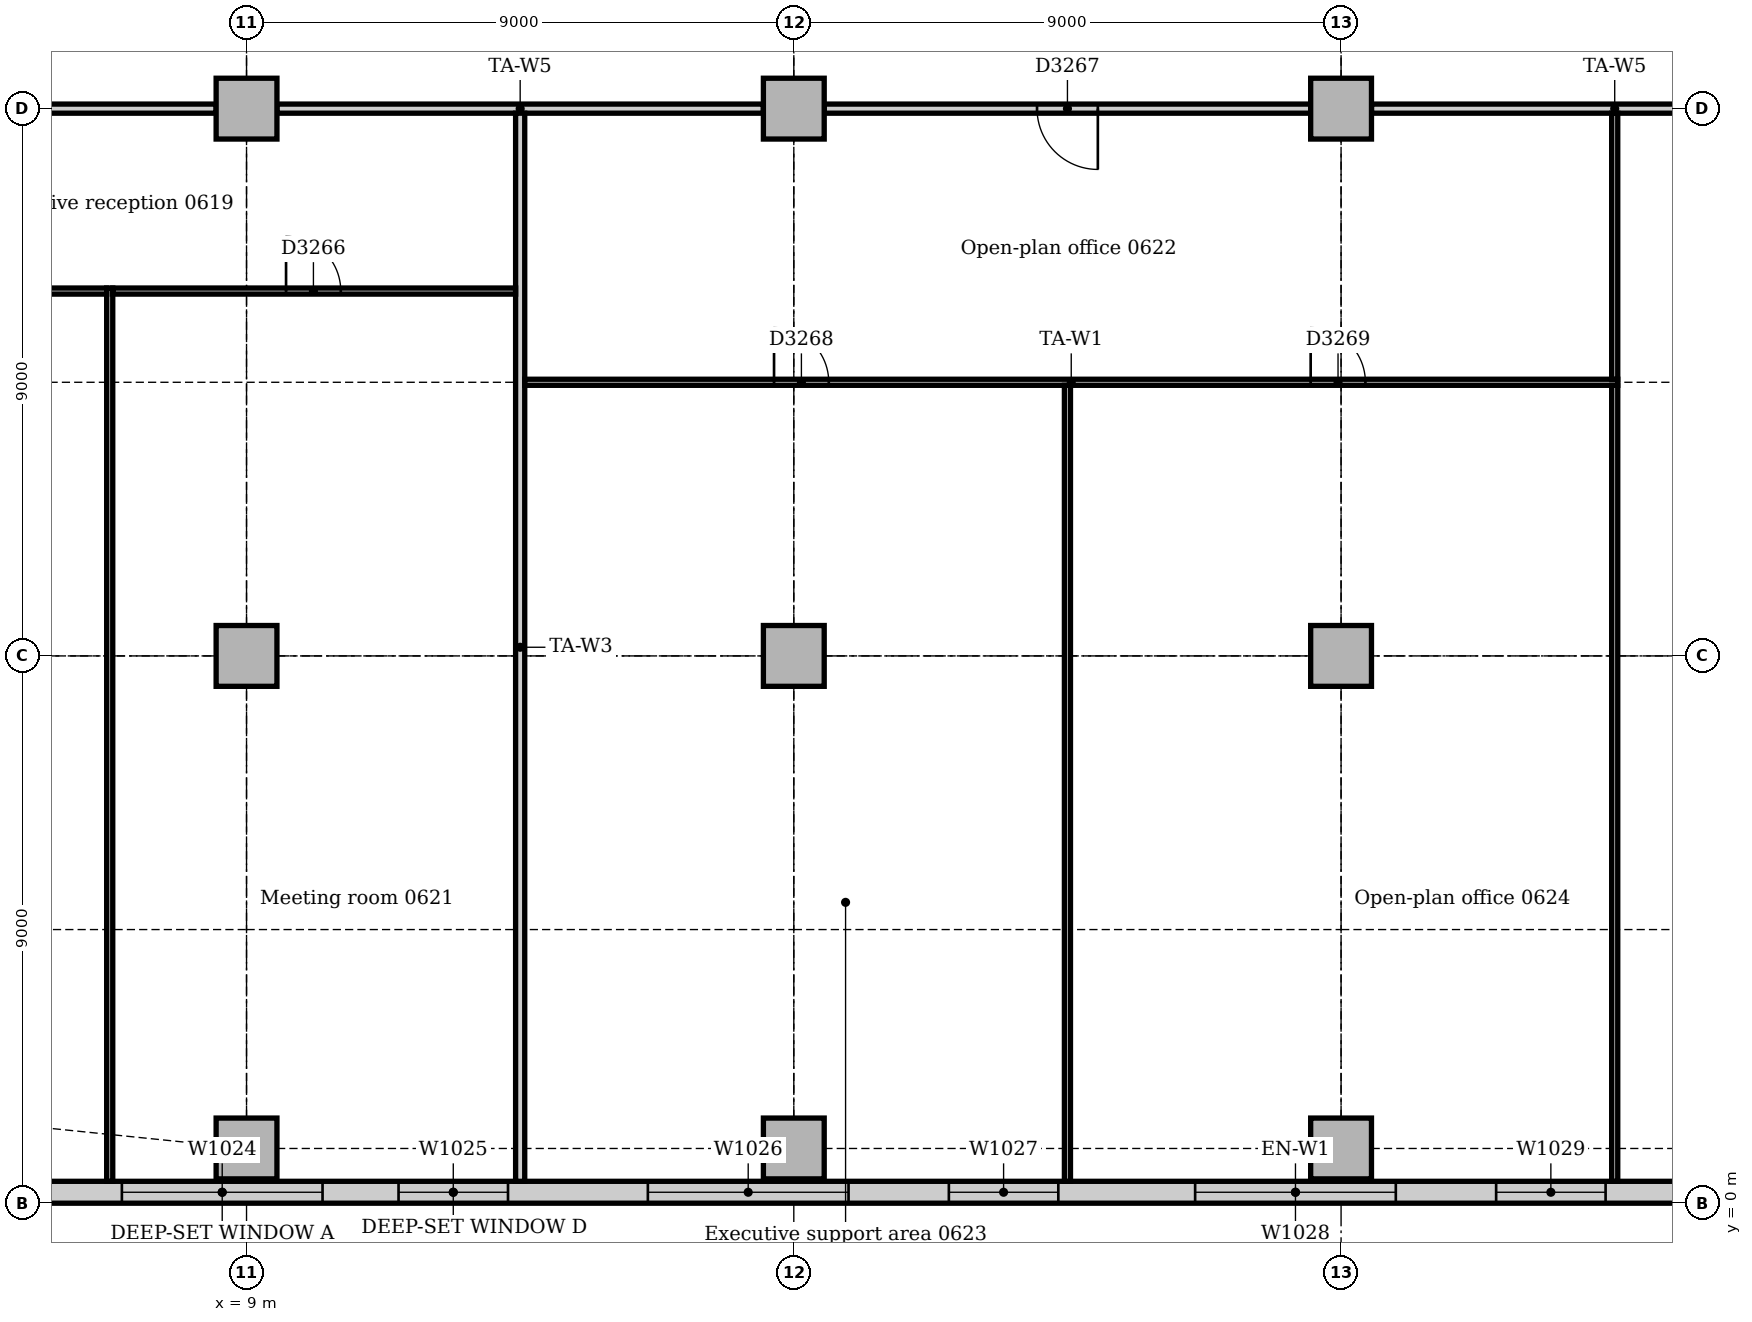
"""IFC4 building model, lengths in metres.
Left out: names, types, materials, properties, quantities, classifications, styles, units other than length and angle.
Written with IfcOpenShell. Run it as: python <this file> out.ifc"""

import sys

from ifc_helpers import new_model, si_unit, direction, frame, frame_2d, origin, origin_2d, place, context, subcontext, project, spatial, rectangle, extrude, element, fill, save


model = new_model("IFC4")
c1 = context("Model", 3, precision=1e-05, world=origin(), true_north=direction((0.0, 1.0)))
c2 = subcontext(c1, "Body", "Model", "MODEL_VIEW")
j1 = project(units=[si_unit("LENGTHUNIT", "METRE"), si_unit("PLANEANGLEUNIT", "RADIAN")], contexts=[c1])
p1 = place(None, origin())
s1 = spatial("IfcSite", under=j1, at=p1, CompositionType="ELEMENT")
p2 = place(p1, origin())
s2 = spatial("IfcBuilding", under=s1, at=p2, CompositionType="ELEMENT")
p3 = place(p2, frame((0.0, 0.0, 30.0)))
s3 = spatial("IfcBuildingStorey", under=s2, at=p3, CompositionType="ELEMENT", Elevation=30.0)
for number, where, z_axis, x_axis in (
    (1, (9.0, 0.9, 0.0), (0.0, 0.0, 1.0), (1.0, 0.0, 0.0)),
    (2, (18.0, 0.9, 0.0), (0.0, 0.0, 1.0), (1.0, 0.0, 0.0)),
    (3, (27.0, 0.9, 0.0), (0.0, 0.0, 1.0), (1.0, 0.0, 0.0)),
    (4, (9.0, 9.0, 0.0), (0.0, 0.0, 1.0), (1.0, 0.0, 0.0)),
    (5, (9.0, 18.0, 0.0), (0.0, 0.0, 1.0), (1.0, 0.0, 0.0)),
    (6, (18.0, 9.0, 0.0), (0.0, 0.0, 1.0), (1.0, 0.0, 0.0)),
    (7, (18.0, 18.0, 0.0), (0.0, 0.0, 1.0), (1.0, 0.0, 0.0)),
    (8, (27.0, 9.0, 0.0), (0.0, 0.0, 1.0), (1.0, 0.0, 0.0)),
    (9, (27.0, 18.0, 0.0), (0.0, 0.0, 1.0), (1.0, 0.0, 0.0)),
):
    element("IfcColumn", number, at=place(p3, frame(where, z_axis=z_axis, x_axis=x_axis)), inside=s3, PredefinedType="COLUMN", context=c2, shape_type="SweptSolid", body=[
        extrude(rectangle(XDim=1.0, YDim=1.0, at=origin_2d()), origin(), (0.0, 0.0, 1.0), 3.85),
    ])
p4 = place(p3, frame((4.243, 0.18, 0.0), z_axis=(0.0, 0.0, 1.0), x_axis=(1.0, 0.0, 0.0)))
e10 = element("IfcWall", 10, at=p4, inside=s3, PredefinedType="STANDARD", context=c2, shape_type="SweptSolid", body=[
    extrude(rectangle(XDim=44.015, YDim=0.36, at=frame_2d((22.007, 0.0))), origin(), (0.0, 0.0, 1.0), 3.85),
])
p5 = place(p4, frame((2.707, 0.0, 0.9)))
e11 = element("IfcOpeningElement", 11, at=p5, cuts=e10, PredefinedType="OPENING", context=c2, shape_type="SweptSolid", body=[
    extrude(rectangle(XDim=3.3, YDim=1.6, at=frame_2d((1.65, 0.8))), frame((0.0, 0.19, 0.0), z_axis=(0.0, -1.0, 0.0), x_axis=(1.0, 0.0, 0.0)), (0.0, 0.0, 1.0), 0.38),
])
p6 = place(p4, frame((7.257, 0.0, 0.9)))
e12 = element("IfcOpeningElement", 12, at=p6, cuts=e10, PredefinedType="OPENING", context=c2, shape_type="SweptSolid", body=[
    extrude(rectangle(XDim=1.8, YDim=1.6, at=frame_2d((0.9, 0.8))), frame((0.0, 0.19, 0.0), z_axis=(0.0, -1.0, 0.0), x_axis=(1.0, 0.0, 0.0)), (0.0, 0.0, 1.0), 0.38),
])
p7 = place(p4, frame((11.357, 0.0, 0.9)))
e13 = element("IfcOpeningElement", 13, at=p7, cuts=e10, PredefinedType="OPENING", context=c2, shape_type="SweptSolid", body=[
    extrude(rectangle(XDim=3.3, YDim=1.6, at=frame_2d((1.65, 0.8))), frame((0.0, 0.19, 0.0), z_axis=(0.0, -1.0, 0.0), x_axis=(1.0, 0.0, 0.0)), (0.0, 0.0, 1.0), 0.38),
])
p8 = place(p4, frame((16.307, 0.0, 0.9)))
e14 = element("IfcOpeningElement", 14, at=p8, cuts=e10, PredefinedType="OPENING", context=c2, shape_type="SweptSolid", body=[
    extrude(rectangle(XDim=1.8, YDim=1.6, at=frame_2d((0.9, 0.8))), frame((0.0, 0.19, 0.0), z_axis=(0.0, -1.0, 0.0), x_axis=(1.0, 0.0, 0.0)), (0.0, 0.0, 1.0), 0.38),
])
p9 = place(p4, frame((20.357, 0.0, 0.9)))
e15 = element("IfcOpeningElement", 15, at=p9, cuts=e10, PredefinedType="OPENING", context=c2, shape_type="SweptSolid", body=[
    extrude(rectangle(XDim=3.3, YDim=1.6, at=frame_2d((1.65, 0.8))), frame((0.0, 0.19, 0.0), z_axis=(0.0, -1.0, 0.0), x_axis=(1.0, 0.0, 0.0)), (0.0, 0.0, 1.0), 0.38),
])
p10 = place(p4, frame((25.307, 0.0, 0.9)))
e16 = element("IfcOpeningElement", 16, at=p10, cuts=e10, PredefinedType="OPENING", context=c2, shape_type="SweptSolid", body=[
    extrude(rectangle(XDim=1.8, YDim=1.6, at=frame_2d((0.9, 0.8))), frame((0.0, 0.19, 0.0), z_axis=(0.0, -1.0, 0.0), x_axis=(1.0, 0.0, 0.0)), (0.0, 0.0, 1.0), 0.38),
])
p11 = place(p4, frame((29.357, 0.0, 0.9)))
e17 = element("IfcOpeningElement", 17, at=p11, cuts=e10, PredefinedType="OPENING", context=c2, shape_type="SweptSolid", body=[
    extrude(rectangle(XDim=3.3, YDim=1.6, at=frame_2d((1.65, 0.8))), frame((0.0, 0.19, 0.0), z_axis=(0.0, -1.0, 0.0), x_axis=(1.0, 0.0, 0.0)), (0.0, 0.0, 1.0), 0.38),
])
p12 = place(p4, frame((33.857, 0.0, 0.9)))
e18 = element("IfcOpeningElement", 18, at=p12, cuts=e10, PredefinedType="OPENING", context=c2, shape_type="SweptSolid", body=[
    extrude(rectangle(XDim=3.3, YDim=1.6, at=frame_2d((1.65, 0.8))), frame((0.0, 0.19, 0.0), z_axis=(0.0, -1.0, 0.0), x_axis=(1.0, 0.0, 0.0)), (0.0, 0.0, 1.0), 0.38),
])
p13 = place(p4, frame((38.357, 0.0, 0.9)))
e19 = element("IfcOpeningElement", 19, at=p13, cuts=e10, PredefinedType="OPENING", context=c2, shape_type="SweptSolid", body=[
    extrude(rectangle(XDim=3.3, YDim=1.6, at=frame_2d((1.65, 0.8))), frame((0.0, 0.19, 0.0), z_axis=(0.0, -1.0, 0.0), x_axis=(1.0, 0.0, 0.0)), (0.0, 0.0, 1.0), 0.38),
])
p14 = place(p3, frame((27.5, 18.0, 0.0), z_axis=(0.0, 0.0, 1.0), x_axis=(1.0, 0.0, 0.0)))
e20 = element("IfcWall", 20, at=p14, inside=s3, PredefinedType="PARTITIONING", context=c2, shape_type="SweptSolid", body=[
    extrude(rectangle(XDim=8.0, YDim=0.15, at=frame_2d((4.0, 0.0))), origin(), (0.0, 0.0, 1.0), 3.15),
])
p15 = place(p3, frame((18.5, 18.0, 0.0), z_axis=(0.0, 0.0, 1.0), x_axis=(1.0, 0.0, 0.0)))
e21 = element("IfcWall", 21, at=p15, inside=s3, PredefinedType="PARTITIONING", context=c2, shape_type="SweptSolid", body=[
    extrude(rectangle(XDim=8.0, YDim=0.15, at=frame_2d((4.0, 0.0))), origin(), (0.0, 0.0, 1.0), 3.15),
])
p16 = place(p15, frame((3.5, 0.0, 0.0)))
e22 = element("IfcOpeningElement", 22, at=p16, cuts=e21, PredefinedType="OPENING", context=c2, shape_type="SweptSolid", body=[
    extrude(rectangle(XDim=1.0, YDim=2.1, at=frame_2d((0.5, 1.05))), frame((0.0, 0.085, 0.0), z_axis=(0.0, -1.0, 0.0), x_axis=(1.0, 0.0, 0.0)), (0.0, 0.0, 1.0), 0.17),
])
p17 = place(p3, frame((9.5, 18.0, 0.0), z_axis=(0.0, 0.0, 1.0), x_axis=(1.0, 0.0, 0.0)))
e23 = element("IfcWall", 23, at=p17, inside=s3, PredefinedType="PARTITIONING", context=c2, shape_type="SweptSolid", body=[
    extrude(rectangle(XDim=8.0, YDim=0.15, at=frame_2d((4.0, 0.0))), origin(), (0.0, 0.0, 1.0), 3.15),
])
p18 = place(p3, frame((1.4, 18.0, 0.0), z_axis=(0.0, 0.0, 1.0), x_axis=(1.0, 0.0, 0.0)))
e24 = element("IfcWall", 24, at=p18, inside=s3, PredefinedType="PARTITIONING", context=c2, shape_type="SweptSolid", body=[
    extrude(rectangle(XDim=7.1, YDim=0.15, at=frame_2d((3.55, 0.0))), origin(), (0.0, 0.0, 1.0), 3.15),
])
p19 = place(p18, frame((3.05, 0.0, 0.0)))
e25 = element("IfcOpeningElement", 25, at=p19, cuts=e24, PredefinedType="OPENING", context=c2, shape_type="SweptSolid", body=[
    extrude(rectangle(XDim=1.0, YDim=2.1, at=frame_2d((0.5, 1.05))), frame((0.0, 0.085, 0.0), z_axis=(0.0, -1.0, 0.0), x_axis=(1.0, 0.0, 0.0)), (0.0, 0.0, 1.0), 0.17),
])
p20 = place(p3, frame((13.5, 0.36, 0.0), z_axis=(0.0, 0.0, 1.0), x_axis=(0.0, 1.0, 0.0)))
e26 = element("IfcWall", 26, at=p20, inside=s3, PredefinedType="PARTITIONING", context=c2, shape_type="SweptSolid", body=[
    extrude(rectangle(XDim=17.565, YDim=0.15, at=frame_2d((8.783, 0.0))), origin(), (0.0, 0.0, 1.0), 3.85),
])
p21 = place(p3, frame((13.575, 13.5, 0.0), z_axis=(0.0, 0.0, 1.0), x_axis=(1.0, 0.0, 0.0)))
e27 = element("IfcWall", 27, at=p21, inside=s3, PredefinedType="PARTITIONING", context=c2, shape_type="SweptSolid", body=[
    extrude(rectangle(XDim=17.975, YDim=0.1, at=frame_2d((8.988, 0.0))), origin(), (0.0, 0.0, 1.0), 3.35),
])
p22 = place(p21, frame((4.1, 0.0, 0.0)))
e28 = element("IfcOpeningElement", 28, at=p22, cuts=e27, PredefinedType="OPENING", context=c2, shape_type="SweptSolid", body=[
    extrude(rectangle(XDim=0.9, YDim=2.1, at=frame_2d((0.45, 1.05))), frame((0.0, 0.06, 0.0), z_axis=(0.0, -1.0, 0.0), x_axis=(1.0, 0.0, 0.0)), (0.0, 0.0, 1.0), 0.12),
])
p23 = place(p21, frame((12.925, 0.0, 0.0)))
e29 = element("IfcOpeningElement", 29, at=p23, cuts=e27, PredefinedType="OPENING", context=c2, shape_type="SweptSolid", body=[
    extrude(rectangle(XDim=0.9, YDim=2.1, at=frame_2d((0.45, 1.05))), frame((0.0, 0.06, 0.0), z_axis=(0.0, -1.0, 0.0), x_axis=(1.0, 0.0, 0.0)), (0.0, 0.0, 1.0), 0.12),
])
p24 = place(p3, frame((31.5, 13.55, 0.0), z_axis=(0.0, 0.0, 1.0), x_axis=(0.0, 1.0, 0.0)))
e30 = element("IfcWall", 30, at=p24, inside=s3, PredefinedType="PARTITIONING", context=c2, shape_type="SweptSolid", body=[
    extrude(rectangle(XDim=4.375, YDim=0.1, at=frame_2d((2.188, 0.0))), origin(), (0.0, 0.0, 1.0), 3.85),
])
p25 = place(p3, frame((31.5, 0.36, 0.0), z_axis=(0.0, 0.0, 1.0), x_axis=(0.0, 1.0, 0.0)))
e31 = element("IfcWall", 31, at=p25, inside=s3, PredefinedType="PARTITIONING", context=c2, shape_type="SweptSolid", body=[
    extrude(rectangle(XDim=13.09, YDim=0.1, at=frame_2d((6.545, 0.0))), origin(), (0.0, 0.0, 1.0), 3.85),
])
p26 = place(p3, frame((6.75, 0.36, 0.0), z_axis=(0.0, 0.0, 1.0), x_axis=(0.0, 1.0, 0.0)))
e32 = element("IfcWall", 32, at=p26, inside=s3, PredefinedType="PARTITIONING", context=c2, shape_type="SweptSolid", body=[
    extrude(rectangle(XDim=14.69, YDim=0.1, at=frame_2d((7.345, 0.0))), origin(), (0.0, 0.0, 1.0), 3.85),
])
p27 = place(p3, frame((6.8, 15.0, 0.0), z_axis=(0.0, 0.0, 1.0), x_axis=(1.0, 0.0, 0.0)))
e33 = element("IfcWall", 33, at=p27, inside=s3, PredefinedType="PARTITIONING", context=c2, shape_type="SweptSolid", body=[
    extrude(rectangle(XDim=6.625, YDim=0.1, at=frame_2d((3.312, 0.0))), origin(), (0.0, 0.0, 1.0), 3.85),
])
p28 = place(p27, frame((2.85, 0.0, 0.0)))
e34 = element("IfcOpeningElement", 34, at=p28, cuts=e33, PredefinedType="OPENING", context=c2, shape_type="SweptSolid", body=[
    extrude(rectangle(XDim=0.9, YDim=2.1, at=frame_2d((0.45, 1.05))), frame((0.0, 0.06, 0.0), z_axis=(0.0, -1.0, 0.0), x_axis=(1.0, 0.0, 0.0)), (0.0, 0.0, 1.0), 0.12),
])
p29 = place(p3, frame((0.36, 15.0, 0.0), z_axis=(0.0, 0.0, 1.0), x_axis=(1.0, 0.0, 0.0)))
e35 = element("IfcWall", 35, at=p29, inside=s3, PredefinedType="PARTITIONING", context=c2, shape_type="SweptSolid", body=[
    extrude(rectangle(XDim=6.34, YDim=0.1, at=frame_2d((3.17, 0.0))), origin(), (0.0, 0.0, 1.0), 3.85),
])
p30 = place(p29, frame((2.7, 0.0, 0.0)))
e36 = element("IfcOpeningElement", 36, at=p30, cuts=e35, PredefinedType="OPENING", context=c2, shape_type="SweptSolid", body=[
    extrude(rectangle(XDim=0.9, YDim=2.1, at=frame_2d((0.45, 1.05))), frame((0.0, 0.06, 0.0), z_axis=(0.0, -1.0, 0.0), x_axis=(1.0, 0.0, 0.0)), (0.0, 0.0, 1.0), 0.12),
])
p31 = place(p3, frame((22.5, 0.36, 0.0), z_axis=(0.0, 0.0, 1.0), x_axis=(0.0, 1.0, 0.0)))
e37 = element("IfcWall", 37, at=p31, inside=s3, PredefinedType="PARTITIONING", context=c2, shape_type="SweptSolid", body=[
    extrude(rectangle(XDim=13.09, YDim=0.1, at=frame_2d((6.545, 0.0))), origin(), (0.0, 0.0, 1.0), 3.85),
])
p32 = place(p5, origin())
e38 = element("IfcWindow", 38, at=p32, inside=s3, PartitioningType="SINGLE_PANEL", PredefinedType="WINDOW", context=c2, shape_type="SweptSolid", body=[
    extrude(rectangle(XDim=3.3, YDim=1.6, at=frame_2d((1.65, 0.8))), frame((0.0, 0.13, 0.0), z_axis=(0.0, -1.0, 0.0), x_axis=(1.0, 0.0, 0.0)), (0.0, 0.0, 1.0), 0.06),
])
fill(e11, e38)
p33 = place(p6, origin())
e39 = element("IfcWindow", 39, at=p33, inside=s3, PartitioningType="SINGLE_PANEL", PredefinedType="WINDOW", context=c2, shape_type="SweptSolid", body=[
    extrude(rectangle(XDim=1.8, YDim=1.6, at=frame_2d((0.9, 0.8))), frame((0.0, 0.13, 0.0), z_axis=(0.0, -1.0, 0.0), x_axis=(1.0, 0.0, 0.0)), (0.0, 0.0, 1.0), 0.06),
])
fill(e12, e39)
p34 = place(p7, origin())
e40 = element("IfcWindow", 40, at=p34, inside=s3, PartitioningType="SINGLE_PANEL", PredefinedType="WINDOW", context=c2, shape_type="SweptSolid", body=[
    extrude(rectangle(XDim=3.3, YDim=1.6, at=frame_2d((1.65, 0.8))), frame((0.0, 0.13, 0.0), z_axis=(0.0, -1.0, 0.0), x_axis=(1.0, 0.0, 0.0)), (0.0, 0.0, 1.0), 0.06),
])
fill(e13, e40)
p35 = place(p8, origin())
e41 = element("IfcWindow", 41, at=p35, inside=s3, PartitioningType="SINGLE_PANEL", PredefinedType="WINDOW", context=c2, shape_type="SweptSolid", body=[
    extrude(rectangle(XDim=1.8, YDim=1.6, at=frame_2d((0.9, 0.8))), frame((0.0, 0.13, 0.0), z_axis=(0.0, -1.0, 0.0), x_axis=(1.0, 0.0, 0.0)), (0.0, 0.0, 1.0), 0.06),
])
fill(e14, e41)
p36 = place(p9, origin())
e42 = element("IfcWindow", 42, at=p36, inside=s3, PartitioningType="SINGLE_PANEL", PredefinedType="WINDOW", context=c2, shape_type="SweptSolid", body=[
    extrude(rectangle(XDim=3.3, YDim=1.6, at=frame_2d((1.65, 0.8))), frame((0.0, 0.13, 0.0), z_axis=(0.0, -1.0, 0.0), x_axis=(1.0, 0.0, 0.0)), (0.0, 0.0, 1.0), 0.06),
])
fill(e15, e42)
p37 = place(p10, origin())
e43 = element("IfcWindow", 43, at=p37, inside=s3, PartitioningType="SINGLE_PANEL", PredefinedType="WINDOW", context=c2, shape_type="SweptSolid", body=[
    extrude(rectangle(XDim=1.8, YDim=1.6, at=frame_2d((0.9, 0.8))), frame((0.0, 0.13, 0.0), z_axis=(0.0, -1.0, 0.0), x_axis=(1.0, 0.0, 0.0)), (0.0, 0.0, 1.0), 0.06),
])
fill(e16, e43)
p38 = place(p28, origin())
e44 = element("IfcDoor", 44, at=p38, inside=s3, OperationType="SINGLE_SWING_LEFT", PredefinedType="DOOR", context=c2, shape_type="SweptSolid", body=[
    extrude(rectangle(XDim=0.9, YDim=2.1, at=frame_2d((0.45, 1.05))), frame((0.0, 0.025, 0.0), z_axis=(0.0, -1.0, 0.0), x_axis=(1.0, 0.0, 0.0)), (0.0, 0.0, 1.0), 0.05),
])
fill(e34, e44)
p39 = place(p16, frame((1.0, 0.0, 0.0), z_axis=(0.0, 0.0, 1.0), x_axis=(-1.0, 0.0, 0.0)))
e45 = element("IfcDoor", 45, at=p39, inside=s3, OperationType="SINGLE_SWING_LEFT", PredefinedType="DOOR", context=c2, shape_type="SweptSolid", body=[
    extrude(rectangle(XDim=1.0, YDim=2.1, at=frame_2d((0.5, 1.05))), frame((0.0, 0.025, 0.0), z_axis=(0.0, -1.0, 0.0), x_axis=(1.0, 0.0, 0.0)), (0.0, 0.0, 1.0), 0.05),
])
fill(e22, e45)
p40 = place(p22, origin())
e46 = element("IfcDoor", 46, at=p40, inside=s3, OperationType="SINGLE_SWING_LEFT", PredefinedType="DOOR", context=c2, shape_type="SweptSolid", body=[
    extrude(rectangle(XDim=0.9, YDim=2.1, at=frame_2d((0.45, 1.05))), frame((0.0, 0.025, 0.0), z_axis=(0.0, -1.0, 0.0), x_axis=(1.0, 0.0, 0.0)), (0.0, 0.0, 1.0), 0.05),
])
fill(e28, e46)
p41 = place(p23, origin())
e47 = element("IfcDoor", 47, at=p41, inside=s3, OperationType="SINGLE_SWING_LEFT", PredefinedType="DOOR", context=c2, shape_type="SweptSolid", body=[
    extrude(rectangle(XDim=0.9, YDim=2.1, at=frame_2d((0.45, 1.05))), frame((0.0, 0.025, 0.0), z_axis=(0.0, -1.0, 0.0), x_axis=(1.0, 0.0, 0.0)), (0.0, 0.0, 1.0), 0.05),
])
fill(e29, e47)
save(model, sys.argv[1])
